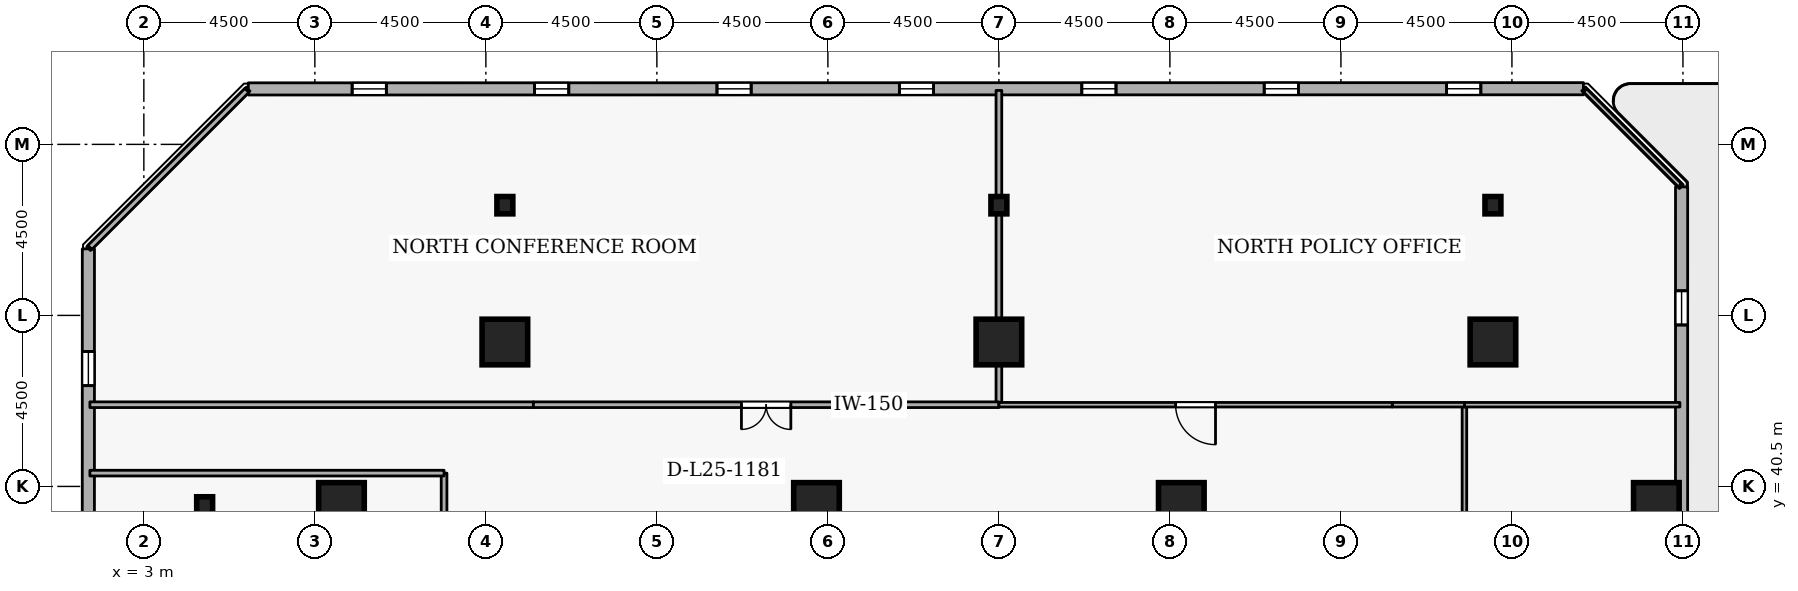
"""IFC4 building model, lengths in metres.
Left out: names, types, materials, properties, quantities, classifications, styles, units other than length and angle.
Written with IfcOpenShell. Run it as: python <this file> out.ifc"""

import sys

from ifc_helpers import new_model, si_unit, direction, frame, frame_2d, origin, origin_2d, place, context, subcontext, project, spatial, rectangle, i_section, extrude, element, fill, save


model = new_model("IFC4")
c1 = context("Model", 3, precision=1e-05, world=origin(), true_north=direction((0.0, 1.0)))
c2 = subcontext(c1, "Body", "Model", "MODEL_VIEW")
j1 = project(units=[si_unit("LENGTHUNIT", "METRE"), si_unit("PLANEANGLEUNIT", "RADIAN")], contexts=[c1])
p1 = place(None, origin())
s1 = spatial("IfcSite", under=j1, at=p1, CompositionType="ELEMENT")
p2 = place(p1, origin())
s2 = spatial("IfcBuilding", under=s1, at=p2, CompositionType="ELEMENT")
p3 = place(p2, frame((0.0, 0.0, 98.1)))
s3 = spatial("IfcBuildingStorey", under=s2, at=p3, CompositionType="ELEMENT", Elevation=98.1)
for number, where, z_axis, x_axis in (
    (1, (42.8, 40.0, 0.0), (0.0, 0.0, 1.0), (1.0, 0.0, 0.0)),
    (2, (12.5, 44.3, 0.0), (0.0, 0.0, 1.0), (1.0, 0.0, 0.0)),
    (3, (25.5, 44.3, 0.0), (0.0, 0.0, 1.0), (1.0, 0.0, 0.0)),
    (4, (38.5, 44.3, 0.0), (0.0, 0.0, 1.0), (1.0, 0.0, 0.0)),
    (5, (8.2, 40.0, 0.0), (0.0, 0.0, 1.0), (1.0, 0.0, 0.0)),
    (6, (20.7, 40.0, 0.0), (0.0, 0.0, 1.0), (1.0, 0.0, 0.0)),
    (7, (30.3, 40.0, 0.0), (0.0, 0.0, 1.0), (1.0, 0.0, 0.0)),
):
    element("IfcColumn", number, at=place(p3, frame(where, z_axis=z_axis, x_axis=x_axis)), inside=s3, PredefinedType="COLUMN", context=c2, shape_type="SweptSolid", body=[
        extrude(rectangle(XDim=1.2, YDim=1.2, at=origin_2d()), origin(), (0.0, 0.0, 1.0), 3.6),
    ])
for number, where, z_axis, x_axis in (
    (8, (12.5, 47.9, 0.0), (0.0, 0.0, 1.0), (1.0, 0.0, 0.0)),
    (9, (25.5, 47.9, 0.0), (0.0, 0.0, 1.0), (1.0, 0.0, 0.0)),
    (10, (38.5, 47.9, 0.0), (0.0, 0.0, 1.0), (1.0, 0.0, 0.0)),
    (11, (4.6, 40.0, 0.0), (0.0, 0.0, 1.0), (1.0, 0.0, 0.0)),
):
    element("IfcColumn", number, at=place(p3, frame(where, z_axis=z_axis, x_axis=x_axis)), inside=s3, PredefinedType="COLUMN", context=c2, shape_type="SweptSolid", body=[
        extrude(i_section(OverallWidth=0.418, OverallDepth=0.456, WebThickness=0.042, FlangeThickness=0.067, FilletRadius=0.015, at=origin_2d()), origin(), (0.0, 0.0, 1.0), 3.6),
    ])
p4 = place(p3, frame((43.459, 13.248, 0.0), z_axis=(0.0, 0.0, 1.0), x_axis=(0.000145929605, 0.999999989352, 0.0)))
e12 = element("IfcWall", 12, at=p4, inside=s3, PredefinedType="STANDARD", context=c2, shape_type="SweptSolid", body=[
    extrude(rectangle(XDim=35.133, YDim=0.32, at=frame_2d((17.566, 0.0))), origin(), (0.0, 0.0, 1.0), 2.7),
])
p5 = place(p4, frame((19.292, 0.0, 0.0)))
e13 = element("IfcOpeningElement", 13, at=p5, cuts=e12, PredefinedType="OPENING", context=c2, shape_type="SweptSolid", body=[
    extrude(rectangle(XDim=1.15, YDim=2.1, at=frame_2d((0.575, 1.05))), frame((0.0, 0.17, 0.0), z_axis=(0.0, -1.0, 0.0), x_axis=(1.0, 0.0, 0.0)), (0.0, 0.0, 1.0), 0.34),
])
p6 = place(p4, frame((2.7, 0.0, 0.72)))
e14 = element("IfcOpeningElement", 14, at=p6, cuts=e12, PredefinedType="OPENING", context=c2, shape_type="SweptSolid", body=[
    extrude(rectangle(XDim=0.9, YDim=1.75, at=frame_2d((0.45, 0.875))), frame((0.0, 0.17, 0.0), z_axis=(0.0, -1.0, 0.0), x_axis=(1.0, 0.0, 0.0)), (0.0, 0.0, 1.0), 0.34),
])
p7 = place(p4, frame((7.5, 0.0, 0.72)))
e15 = element("IfcOpeningElement", 15, at=p7, cuts=e12, PredefinedType="OPENING", context=c2, shape_type="SweptSolid", body=[
    extrude(rectangle(XDim=0.9, YDim=1.75, at=frame_2d((0.45, 0.875))), frame((0.0, 0.17, 0.0), z_axis=(0.0, -1.0, 0.0), x_axis=(1.0, 0.0, 0.0)), (0.0, 0.0, 1.0), 0.34),
])
p8 = place(p4, frame((17.1, 0.0, 0.72)))
e16 = element("IfcOpeningElement", 16, at=p8, cuts=e12, PredefinedType="OPENING", context=c2, shape_type="SweptSolid", body=[
    extrude(rectangle(XDim=0.9, YDim=1.75, at=frame_2d((0.45, 0.875))), frame((0.0, 0.17, 0.0), z_axis=(0.0, -1.0, 0.0), x_axis=(1.0, 0.0, 0.0)), (0.0, 0.0, 1.0), 0.34),
])
p9 = place(p4, frame((21.9, 0.0, 0.72)))
e17 = element("IfcOpeningElement", 17, at=p9, cuts=e12, PredefinedType="OPENING", context=c2, shape_type="SweptSolid", body=[
    extrude(rectangle(XDim=0.9, YDim=1.75, at=frame_2d((0.45, 0.875))), frame((0.0, 0.17, 0.0), z_axis=(0.0, -1.0, 0.0), x_axis=(1.0, 0.0, 0.0)), (0.0, 0.0, 1.0), 0.34),
])
p10 = place(p4, frame((31.5, 0.0, 0.72)))
e18 = element("IfcOpeningElement", 18, at=p10, cuts=e12, PredefinedType="OPENING", context=c2, shape_type="SweptSolid", body=[
    extrude(rectangle(XDim=0.9, YDim=1.75, at=frame_2d((0.45, 0.875))), frame((0.0, 0.17, 0.0), z_axis=(0.0, -1.0, 0.0), x_axis=(1.0, 0.0, 0.0)), (0.0, 0.0, 1.0), 0.34),
])
p11 = place(p3, frame((40.881, 50.965, 0.0), z_axis=(0.0, 0.0, 1.0), x_axis=(-0.999999989352, -0.000145929605, 0.0)))
e19 = element("IfcWall", 19, at=p11, inside=s3, PredefinedType="STANDARD", context=c2, shape_type="SweptSolid", body=[
    extrude(rectangle(XDim=35.133, YDim=0.32, at=frame_2d((17.566, 0.0))), origin(), (0.0, 0.0, 1.0), 2.7),
])
p12 = place(p11, frame((2.7, 0.0, 0.72)))
e20 = element("IfcOpeningElement", 20, at=p12, cuts=e19, PredefinedType="OPENING", context=c2, shape_type="SweptSolid", body=[
    extrude(rectangle(XDim=0.9, YDim=1.75, at=frame_2d((0.45, 0.875))), frame((0.0, 0.17, 0.0), z_axis=(0.0, -1.0, 0.0), x_axis=(1.0, 0.0, 0.0)), (0.0, 0.0, 1.0), 0.34),
])
p13 = place(p11, frame((7.5, 0.0, 0.72)))
e21 = element("IfcOpeningElement", 21, at=p13, cuts=e19, PredefinedType="OPENING", context=c2, shape_type="SweptSolid", body=[
    extrude(rectangle(XDim=0.9, YDim=1.75, at=frame_2d((0.45, 0.875))), frame((0.0, 0.17, 0.0), z_axis=(0.0, -1.0, 0.0), x_axis=(1.0, 0.0, 0.0)), (0.0, 0.0, 1.0), 0.34),
])
p14 = place(p11, frame((12.3, 0.0, 0.72)))
e22 = element("IfcOpeningElement", 22, at=p14, cuts=e19, PredefinedType="OPENING", context=c2, shape_type="SweptSolid", body=[
    extrude(rectangle(XDim=0.9, YDim=1.75, at=frame_2d((0.45, 0.875))), frame((0.0, 0.17, 0.0), z_axis=(0.0, -1.0, 0.0), x_axis=(1.0, 0.0, 0.0)), (0.0, 0.0, 1.0), 0.34),
])
p15 = place(p11, frame((17.1, 0.0, 0.72)))
e23 = element("IfcOpeningElement", 23, at=p15, cuts=e19, PredefinedType="OPENING", context=c2, shape_type="SweptSolid", body=[
    extrude(rectangle(XDim=0.9, YDim=1.75, at=frame_2d((0.45, 0.875))), frame((0.0, 0.17, 0.0), z_axis=(0.0, -1.0, 0.0), x_axis=(1.0, 0.0, 0.0)), (0.0, 0.0, 1.0), 0.34),
])
p16 = place(p11, frame((21.9, 0.0, 0.72)))
e24 = element("IfcOpeningElement", 24, at=p16, cuts=e19, PredefinedType="OPENING", context=c2, shape_type="SweptSolid", body=[
    extrude(rectangle(XDim=0.9, YDim=1.75, at=frame_2d((0.45, 0.875))), frame((0.0, 0.17, 0.0), z_axis=(0.0, -1.0, 0.0), x_axis=(1.0, 0.0, 0.0)), (0.0, 0.0, 1.0), 0.34),
])
p17 = place(p11, frame((26.7, 0.0, 0.72)))
e25 = element("IfcOpeningElement", 25, at=p17, cuts=e19, PredefinedType="OPENING", context=c2, shape_type="SweptSolid", body=[
    extrude(rectangle(XDim=0.9, YDim=1.75, at=frame_2d((0.45, 0.875))), frame((0.0, 0.17, 0.0), z_axis=(0.0, -1.0, 0.0), x_axis=(1.0, 0.0, 0.0)), (0.0, 0.0, 1.0), 0.34),
])
p18 = place(p11, frame((31.5, 0.0, 0.72)))
e26 = element("IfcOpeningElement", 26, at=p18, cuts=e19, PredefinedType="OPENING", context=c2, shape_type="SweptSolid", body=[
    extrude(rectangle(XDim=0.9, YDim=1.75, at=frame_2d((0.45, 0.875))), frame((0.0, 0.17, 0.0), z_axis=(0.0, -1.0, 0.0), x_axis=(1.0, 0.0, 0.0)), (0.0, 0.0, 1.0), 0.34),
])
p19 = place(p3, frame((1.541, 46.752, 0.0), z_axis=(0.0, 0.0, 1.0), x_axis=(-0.000145929605, -0.999999989352, 0.0)))
e27 = element("IfcWall", 27, at=p19, inside=s3, PredefinedType="STANDARD", context=c2, shape_type="SweptSolid", body=[
    extrude(rectangle(XDim=35.133, YDim=0.32, at=frame_2d((17.566, 0.0))), origin(), (0.0, 0.0, 1.0), 2.7),
])
p20 = place(p19, frame((2.7, 0.0, 0.72)))
e28 = element("IfcOpeningElement", 28, at=p20, cuts=e27, PredefinedType="OPENING", context=c2, shape_type="SweptSolid", body=[
    extrude(rectangle(XDim=0.9, YDim=1.75, at=frame_2d((0.45, 0.875))), frame((0.0, 0.17, 0.0), z_axis=(0.0, -1.0, 0.0), x_axis=(1.0, 0.0, 0.0)), (0.0, 0.0, 1.0), 0.34),
])
p21 = place(p19, frame((7.5, 0.0, 0.72)))
e29 = element("IfcOpeningElement", 29, at=p21, cuts=e27, PredefinedType="OPENING", context=c2, shape_type="SweptSolid", body=[
    extrude(rectangle(XDim=0.9, YDim=1.75, at=frame_2d((0.45, 0.875))), frame((0.0, 0.17, 0.0), z_axis=(0.0, -1.0, 0.0), x_axis=(1.0, 0.0, 0.0)), (0.0, 0.0, 1.0), 0.34),
])
p22 = place(p19, frame((12.3, 0.0, 0.72)))
e30 = element("IfcOpeningElement", 30, at=p22, cuts=e27, PredefinedType="OPENING", context=c2, shape_type="SweptSolid", body=[
    extrude(rectangle(XDim=0.9, YDim=1.75, at=frame_2d((0.45, 0.875))), frame((0.0, 0.17, 0.0), z_axis=(0.0, -1.0, 0.0), x_axis=(1.0, 0.0, 0.0)), (0.0, 0.0, 1.0), 0.34),
])
p23 = place(p19, frame((17.1, 0.0, 0.72)))
e31 = element("IfcOpeningElement", 31, at=p23, cuts=e27, PredefinedType="OPENING", context=c2, shape_type="SweptSolid", body=[
    extrude(rectangle(XDim=0.9, YDim=1.75, at=frame_2d((0.45, 0.875))), frame((0.0, 0.17, 0.0), z_axis=(0.0, -1.0, 0.0), x_axis=(1.0, 0.0, 0.0)), (0.0, 0.0, 1.0), 0.34),
])
p24 = place(p19, frame((21.9, 0.0, 0.72)))
e32 = element("IfcOpeningElement", 32, at=p24, cuts=e27, PredefinedType="OPENING", context=c2, shape_type="SweptSolid", body=[
    extrude(rectangle(XDim=0.9, YDim=1.75, at=frame_2d((0.45, 0.875))), frame((0.0, 0.17, 0.0), z_axis=(0.0, -1.0, 0.0), x_axis=(1.0, 0.0, 0.0)), (0.0, 0.0, 1.0), 0.34),
])
p25 = place(p19, frame((26.7, 0.0, 0.72)))
e33 = element("IfcOpeningElement", 33, at=p25, cuts=e27, PredefinedType="OPENING", context=c2, shape_type="SweptSolid", body=[
    extrude(rectangle(XDim=0.9, YDim=1.75, at=frame_2d((0.45, 0.875))), frame((0.0, 0.17, 0.0), z_axis=(0.0, -1.0, 0.0), x_axis=(1.0, 0.0, 0.0)), (0.0, 0.0, 1.0), 0.34),
])
p26 = place(p19, frame((31.5, 0.0, 0.72)))
e34 = element("IfcOpeningElement", 34, at=p26, cuts=e27, PredefinedType="OPENING", context=c2, shape_type="SweptSolid", body=[
    extrude(rectangle(XDim=0.9, YDim=1.75, at=frame_2d((0.45, 0.875))), frame((0.0, 0.17, 0.0), z_axis=(0.0, -1.0, 0.0), x_axis=(1.0, 0.0, 0.0)), (0.0, 0.0, 1.0), 0.34),
])
p27 = place(p3, frame((10.9, 40.85, 0.0), z_axis=(0.0, 0.0, 1.0), x_axis=(0.0, -1.0, 0.0)))
e35 = element("IfcWall", 35, at=p27, inside=s3, PredefinedType="PARTITIONING", context=c2, shape_type="SweptSolid", body=[
    extrude(rectangle(XDim=4.912, YDim=0.15, at=frame_2d((2.456, 0.0))), origin(), (0.0, 0.0, 1.0), 3.3),
])
p28 = place(p3, frame((1.58, 40.85, 0.0), z_axis=(0.0, 0.0, 1.0), x_axis=(1.0, 0.0, 0.0)))
e36 = element("IfcWall", 36, at=p28, inside=s3, PredefinedType="PARTITIONING", context=c2, shape_type="SweptSolid", body=[
    extrude(rectangle(XDim=9.32, YDim=0.15, at=frame_2d((4.66, 0.0))), origin(), (0.0, 0.0, 1.0), 3.3),
])
p29 = place(p3, frame((37.75, 33.3, 0.0), z_axis=(0.0, 0.0, 1.0), x_axis=(0.0, 1.0, 0.0)))
e37 = element("IfcWall", 37, at=p29, inside=s3, PredefinedType="PARTITIONING", context=c2, shape_type="SweptSolid", body=[
    extrude(rectangle(XDim=9.35, YDim=0.12, at=frame_2d((4.675, 0.0))), origin(), (0.0, 0.0, 1.0), 3.3),
])
p30 = place(p29, frame((4.15, 0.0, 0.0)))
e38 = element("IfcOpeningElement", 38, at=p30, cuts=e37, PredefinedType="OPENING", context=c2, shape_type="SweptSolid", body=[
    extrude(rectangle(XDim=1.05, YDim=2.1, at=frame_2d((0.525, 1.05))), frame((0.0, 0.07, 0.0), z_axis=(0.0, -1.0, 0.0), x_axis=(1.0, 0.0, 0.0)), (0.0, 0.0, 1.0), 0.14),
])
p31 = place(p3, frame((37.75, 42.65, 0.0), z_axis=(0.0, 0.0, 1.0), x_axis=(1.0, 0.0, 0.0)))
e39 = element("IfcWall", 39, at=p31, inside=s3, PredefinedType="PARTITIONING", context=c2, shape_type="SweptSolid", body=[
    extrude(rectangle(XDim=5.67, YDim=0.12, at=frame_2d((2.835, 0.0))), origin(), (0.0, 0.0, 1.0), 3.3),
])
p32 = place(p3, frame((13.25, 42.65, 0.0), z_axis=(0.0, 0.0, 1.0), x_axis=(-1.0, 0.0, 0.0)))
e40 = element("IfcWall", 40, at=p32, inside=s3, PredefinedType="PARTITIONING", context=c2, shape_type="SweptSolid", body=[
    extrude(rectangle(XDim=11.67, YDim=0.15, at=frame_2d((5.835, 0.0))), origin(), (0.0, 0.0, 1.0), 3.3),
])
p33 = place(p3, frame((1.58, 46.789, 0.0), z_axis=(0.0, 0.0, 1.0), x_axis=(0.707106781187, 0.707106781187, 0.0)))
e41 = element("IfcWall", 41, at=p33, inside=s3, PredefinedType="PARTITIONING", context=c2, shape_type="SweptSolid", body=[
    extrude(rectangle(XDim=5.842, YDim=0.15, at=frame_2d((2.921, 0.0))), origin(), (0.0, 0.0, 1.0), 3.3),
])
p34 = place(p3, frame((25.5, 50.92, 0.0), z_axis=(0.0, 0.0, 1.0), x_axis=(0.0, -1.0, 0.0)))
e42 = element("IfcWall", 42, at=p34, inside=s3, PredefinedType="PARTITIONING", context=c2, shape_type="SweptSolid", body=[
    extrude(rectangle(XDim=8.27, YDim=0.15, at=frame_2d((4.135, 0.0))), origin(), (0.0, 0.0, 1.0), 2.838),
])
p35 = place(p3, frame((25.5, 42.65, 0.0), z_axis=(0.0, 0.0, 1.0), x_axis=(-1.0, 0.0, 0.0)))
e43 = element("IfcWall", 43, at=p35, inside=s3, PredefinedType="PARTITIONING", context=c2, shape_type="SweptSolid", body=[
    extrude(rectangle(XDim=12.25, YDim=0.15, at=frame_2d((6.125, 0.0))), origin(), (0.0, 0.0, 1.0), 3.3),
])
p36 = place(p35, frame((5.475, 0.0, 0.0)))
e44 = element("IfcOpeningElement", 44, at=p36, cuts=e43, PredefinedType="OPENING", context=c2, shape_type="SweptSolid", body=[
    extrude(rectangle(XDim=1.3, YDim=2.12, at=frame_2d((0.65, 1.06))), frame((0.0, 0.085, 0.0), z_axis=(0.0, -1.0, 0.0), x_axis=(1.0, 0.0, 0.0)), (0.0, 0.0, 1.0), 0.17),
])
p37 = place(p3, frame((37.75, 42.65, 0.0), z_axis=(0.0, 0.0, 1.0), x_axis=(-1.0, 0.0, 0.0)))
e45 = element("IfcWall", 45, at=p37, inside=s3, PredefinedType="PARTITIONING", context=c2, shape_type="SweptSolid", body=[
    extrude(rectangle(XDim=1.9, YDim=0.12, at=frame_2d((0.95, 0.0))), origin(), (0.0, 0.0, 1.0), 3.3),
])
p38 = place(p3, frame((35.85, 42.65, 0.0), z_axis=(0.0, 0.0, 1.0), x_axis=(-1.0, 0.0, 0.0)))
e46 = element("IfcWall", 46, at=p38, inside=s3, PredefinedType="PARTITIONING", context=c2, shape_type="SweptSolid", body=[
    extrude(rectangle(XDim=10.35, YDim=0.12, at=frame_2d((5.175, 0.0))), origin(), (0.0, 0.0, 1.0), 2.855),
])
p39 = place(p38, frame((4.65, 0.0, 0.0)))
e47 = element("IfcOpeningElement", 47, at=p39, cuts=e46, PredefinedType="OPENING", context=c2, shape_type="SweptSolid", body=[
    extrude(rectangle(XDim=1.05, YDim=2.1, at=frame_2d((0.525, 1.05))), frame((0.0, 0.07, 0.0), z_axis=(0.0, -1.0, 0.0), x_axis=(1.0, 0.0, 0.0)), (0.0, 0.0, 1.0), 0.14),
])
p40 = place(p3, frame((40.925, 50.92, 0.0), z_axis=(0.0, 0.0, 1.0), x_axis=(0.707106781187, -0.707106781187, 0.0)))
e48 = element("IfcWall", 48, at=p40, inside=s3, PredefinedType="PARTITIONING", context=c2, shape_type="SweptSolid", body=[
    extrude(rectangle(XDim=3.528, YDim=0.12, at=frame_2d((1.764, 0.0))), origin(), (0.0, 0.0, 1.0), 3.3),
])
p41 = place(p10, origin())
e49 = element("IfcWindow", 49, at=p41, inside=s3, PartitioningType="SINGLE_PANEL", PredefinedType="WINDOW", context=c2, shape_type="SweptSolid", body=[
    extrude(rectangle(XDim=0.9, YDim=1.75, at=frame_2d((0.45, 0.875))), frame((0.0, 0.03, 0.0), z_axis=(0.0, -1.0, 0.0), x_axis=(1.0, 0.0, 0.0)), (0.0, 0.0, 1.0), 0.06),
])
fill(e18, e49)
p42 = place(p12, origin())
e50 = element("IfcWindow", 50, at=p42, inside=s3, PartitioningType="SINGLE_PANEL", PredefinedType="WINDOW", context=c2, shape_type="SweptSolid", body=[
    extrude(rectangle(XDim=0.9, YDim=1.75, at=frame_2d((0.45, 0.875))), frame((0.0, 0.03, 0.0), z_axis=(0.0, -1.0, 0.0), x_axis=(1.0, 0.0, 0.0)), (0.0, 0.0, 1.0), 0.06),
])
fill(e20, e50)
p43 = place(p13, origin())
e51 = element("IfcWindow", 51, at=p43, inside=s3, PartitioningType="SINGLE_PANEL", PredefinedType="WINDOW", context=c2, shape_type="SweptSolid", body=[
    extrude(rectangle(XDim=0.9, YDim=1.75, at=frame_2d((0.45, 0.875))), frame((0.0, 0.03, 0.0), z_axis=(0.0, -1.0, 0.0), x_axis=(1.0, 0.0, 0.0)), (0.0, 0.0, 1.0), 0.06),
])
fill(e21, e51)
p44 = place(p14, origin())
e52 = element("IfcWindow", 52, at=p44, inside=s3, PartitioningType="SINGLE_PANEL", PredefinedType="WINDOW", context=c2, shape_type="SweptSolid", body=[
    extrude(rectangle(XDim=0.9, YDim=1.75, at=frame_2d((0.45, 0.875))), frame((0.0, 0.03, 0.0), z_axis=(0.0, -1.0, 0.0), x_axis=(1.0, 0.0, 0.0)), (0.0, 0.0, 1.0), 0.06),
])
fill(e22, e52)
p45 = place(p15, origin())
e53 = element("IfcWindow", 53, at=p45, inside=s3, PartitioningType="SINGLE_PANEL", PredefinedType="WINDOW", context=c2, shape_type="SweptSolid", body=[
    extrude(rectangle(XDim=0.9, YDim=1.75, at=frame_2d((0.45, 0.875))), frame((0.0, 0.03, 0.0), z_axis=(0.0, -1.0, 0.0), x_axis=(1.0, 0.0, 0.0)), (0.0, 0.0, 1.0), 0.06),
])
fill(e23, e53)
p46 = place(p16, origin())
e54 = element("IfcWindow", 54, at=p46, inside=s3, PartitioningType="SINGLE_PANEL", PredefinedType="WINDOW", context=c2, shape_type="SweptSolid", body=[
    extrude(rectangle(XDim=0.9, YDim=1.75, at=frame_2d((0.45, 0.875))), frame((0.0, 0.03, 0.0), z_axis=(0.0, -1.0, 0.0), x_axis=(1.0, 0.0, 0.0)), (0.0, 0.0, 1.0), 0.06),
])
fill(e24, e54)
p47 = place(p17, origin())
e55 = element("IfcWindow", 55, at=p47, inside=s3, PartitioningType="SINGLE_PANEL", PredefinedType="WINDOW", context=c2, shape_type="SweptSolid", body=[
    extrude(rectangle(XDim=0.9, YDim=1.75, at=frame_2d((0.45, 0.875))), frame((0.0, 0.03, 0.0), z_axis=(0.0, -1.0, 0.0), x_axis=(1.0, 0.0, 0.0)), (0.0, 0.0, 1.0), 0.06),
])
fill(e25, e55)
p48 = place(p18, origin())
e56 = element("IfcWindow", 56, at=p48, inside=s3, PartitioningType="SINGLE_PANEL", PredefinedType="WINDOW", context=c2, shape_type="SweptSolid", body=[
    extrude(rectangle(XDim=0.9, YDim=1.75, at=frame_2d((0.45, 0.875))), frame((0.0, 0.03, 0.0), z_axis=(0.0, -1.0, 0.0), x_axis=(1.0, 0.0, 0.0)), (0.0, 0.0, 1.0), 0.06),
])
fill(e26, e56)
p49 = place(p20, origin())
e57 = element("IfcWindow", 57, at=p49, inside=s3, PartitioningType="SINGLE_PANEL", PredefinedType="WINDOW", context=c2, shape_type="SweptSolid", body=[
    extrude(rectangle(XDim=0.9, YDim=1.75, at=frame_2d((0.45, 0.875))), frame((0.0, 0.03, 0.0), z_axis=(0.0, -1.0, 0.0), x_axis=(1.0, 0.0, 0.0)), (0.0, 0.0, 1.0), 0.06),
])
fill(e28, e57)
p50 = place(p36, origin())
e58 = element("IfcDoor", 58, at=p50, inside=s3, OperationType="DOUBLE_DOOR_SINGLE_SWING", PredefinedType="DOOR", context=c2, shape_type="SweptSolid", body=[
    extrude(rectangle(XDim=1.3, YDim=2.12, at=frame_2d((0.65, 1.06))), frame((0.0, 0.025, 0.0), z_axis=(0.0, -1.0, 0.0), x_axis=(1.0, 0.0, 0.0)), (0.0, 0.0, 1.0), 0.05),
])
fill(e44, e58)
p51 = place(p39, origin())
e59 = element("IfcDoor", 59, at=p51, inside=s3, OperationType="SINGLE_SWING_LEFT", PredefinedType="DOOR", context=c2, shape_type="SweptSolid", body=[
    extrude(rectangle(XDim=1.05, YDim=2.1, at=frame_2d((0.525, 1.05))), frame((0.0, 0.025, 0.0), z_axis=(0.0, -1.0, 0.0), x_axis=(1.0, 0.0, 0.0)), (0.0, 0.0, 1.0), 0.05),
])
fill(e47, e59)
save(model, sys.argv[1])
